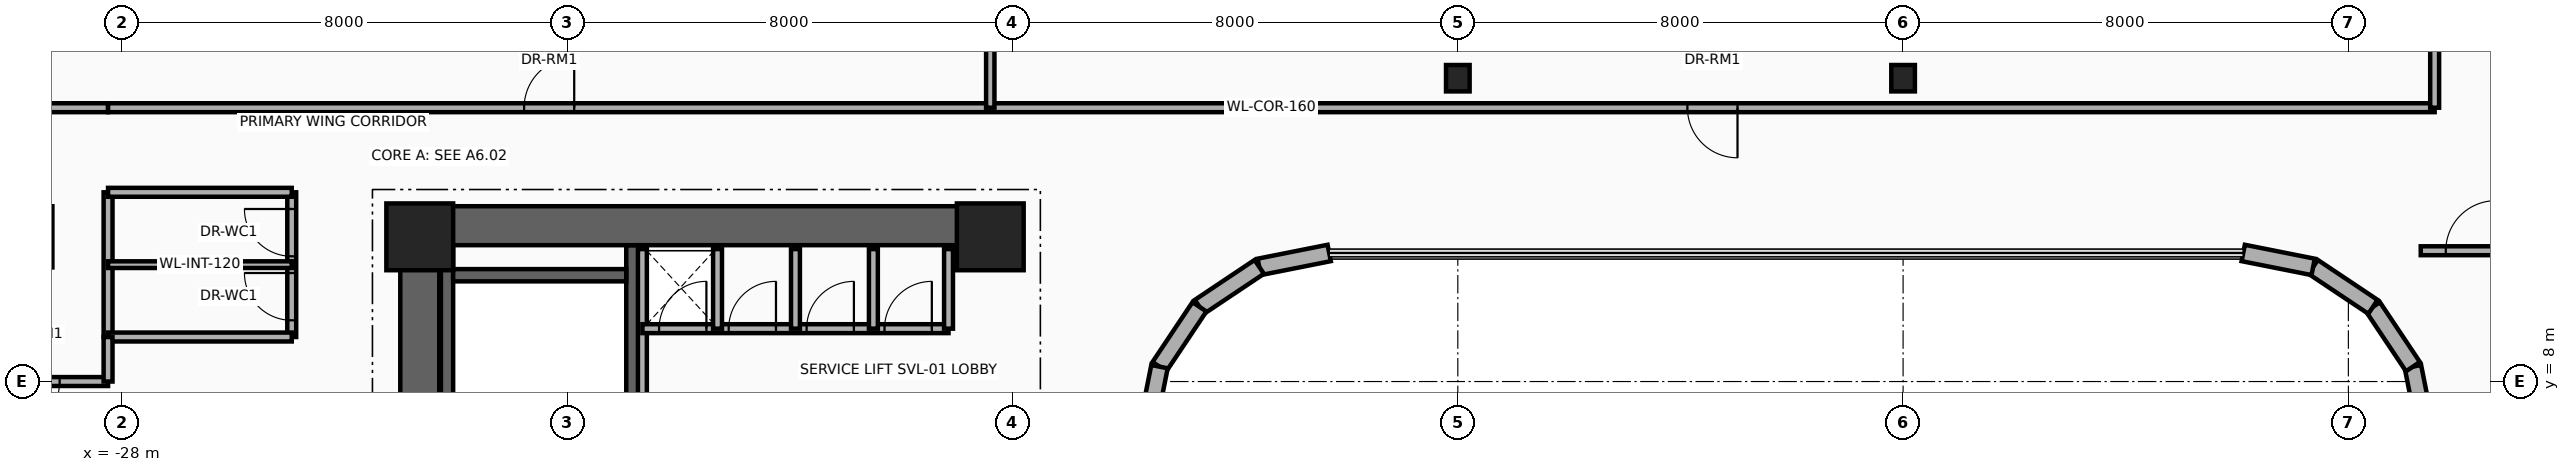
"""IFC4 building model, lengths in metres.
Left out: names, types, materials, properties, quantities, classifications, styles, units other than length and angle.
Written with IfcOpenShell. Run it as: python <this file> out.ifc"""

import sys

from ifc_helpers import new_model, si_unit, direction, frame, frame_2d, origin, origin_2d, place, context, subcontext, project, spatial, rectangle, i_section, extrude, source, transform, mapped, element, fill, save


model = new_model("IFC4")
c1 = context("Model", 3, precision=1e-05, world=origin(), true_north=direction((0.0, 1.0)))
c2 = subcontext(c1, "Body", "Model", "MODEL_VIEW")
j1 = project(units=[si_unit("LENGTHUNIT", "METRE"), si_unit("PLANEANGLEUNIT", "RADIAN")], contexts=[c1])
p1 = place(None, origin())
s1 = spatial("IfcSite", under=j1, at=p1, CompositionType="ELEMENT")
p2 = place(p1, origin())
s2 = spatial("IfcBuilding", under=s1, at=p2, CompositionType="ELEMENT")
p3 = place(p2, frame((0.0, 0.0, 124.2)))
s3 = spatial("IfcBuildingStorey", under=s2, at=p3, CompositionType="ELEMENT", Elevation=124.2)
for number, where, z_axis, x_axis in (
    (1, (-22.16, 1.78, 0.0), (0.0, 0.0, 1.0), (0.0, 1.0, 0.0)),
    (2, (-18.83, 1.78, 0.0), (0.0, 0.0, 1.0), (0.0, 1.0, 0.0)),
):
    element("IfcWall", number, at=place(p3, frame(where, z_axis=z_axis, x_axis=x_axis)), inside=s3, PredefinedType="SHEAR", context=c2, shape_type="SweptSolid", body=[
        extrude(rectangle(XDim=8.67, YDim=0.22, at=frame_2d((4.335, 0.0))), origin(), (0.0, 0.0, 1.0), 3.46),
    ])
p4 = place(p3, frame((-22.05, 9.91, 0.0), z_axis=(0.0, 0.0, 1.0), x_axis=(1.0, 0.0, 0.0)))
e3 = element("IfcWall", 3, at=p4, inside=s3, PredefinedType="SHEAR", context=c2, shape_type="SweptSolid", body=[
    extrude(rectangle(XDim=3.11, YDim=0.22, at=frame_2d((1.555, 0.0))), origin(), (0.0, 0.0, 1.0), 3.46),
])
p5 = place(p3, frame((-22.65, -11.15, 0.0), z_axis=(0.0, 0.0, 1.0), x_axis=(0.0, 1.0, 0.0)))
e4 = element("IfcWall", 4, at=p5, inside=s3, PredefinedType="SHEAR", context=c2, shape_type="SweptSolid", body=[
    extrude(rectangle(XDim=22.3, YDim=0.7, at=frame_2d((11.15, 0.0))), origin(), (0.0, 0.0, 1.0), 3.46),
])
p6 = place(p3, frame((-22.65, 10.8, 0.0), z_axis=(0.0, 0.0, 1.0), x_axis=(1.0, 0.0, 0.0)))
e5 = element("IfcWall", 5, at=p6, inside=s3, PredefinedType="SHEAR", context=c2, shape_type="SweptSolid", body=[
    extrude(rectangle(XDim=10.25, YDim=0.7, at=frame_2d((5.125, 0.0))), origin(), (0.0, 0.0, 1.0), 3.46),
])
m1 = source(origin(), c2, "Body", "SweptSolid", [
    extrude(rectangle(XDim=1.2, YDim=1.2, at=origin_2d()), origin(), (0.0, 0.0, 1.0), 3.7),
])
for number, where, z_axis, x_axis in (
    (6, (-22.65, 10.6, 0.0), (0.0, 0.0, 1.0), (1.0, 0.0, 0.0)),
    (7, (-12.4, 10.6, 0.0), (0.0, 0.0, 1.0), (1.0, 0.0, 0.0)),
):
    element("IfcColumn", number, at=place(p3, frame(where, z_axis=z_axis, x_axis=x_axis)), inside=s3, PredefinedType="COLUMN", context=c2, shape_type="MappedRepresentation", body=[
        mapped(m1, transform((0.0, 0.0, 0.0), x_axis=(1.0, 0.0, 0.0), y_axis=(0.0, 1.0, 0.0), z_axis=(0.0, 0.0, 1.0), scale=1.0)),
    ])
m2 = source(origin(), c2, "Body", "SweptSolid", [
    extrude(i_section(OverallWidth=0.424, OverallDepth=0.474, WebThickness=0.048, FlangeThickness=0.077, at=origin_2d()), origin(), (0.0, 0.0, 1.0), 3.7),
])
for number, where, z_axis, x_axis in (
    (8, (-4.0, 13.45, 0.0), (0.0, 0.0, 1.0), (1.0, 0.0, 0.0)),
    (9, (4.0, 13.45, 0.0), (0.0, 0.0, 1.0), (1.0, 0.0, 0.0)),
):
    element("IfcColumn", number, at=place(p3, frame(where, z_axis=z_axis, x_axis=x_axis)), inside=s3, PredefinedType="COLUMN", context=c2, shape_type="MappedRepresentation", body=[
        mapped(m2, transform((0.0, 0.0, 0.0), x_axis=(1.0, 0.0, 0.0), y_axis=(0.0, 1.0, 0.0), z_axis=(0.0, 0.0, 1.0), scale=1.0)),
    ])
p7 = place(p3, frame((13.41, 7.011, 0.0), z_axis=(0.0, 0.0, 1.0), x_axis=(-0.195090163074, 0.980785312019, 0.0)))
e10 = element("IfcWall", 10, at=p7, inside=s3, PredefinedType="SOLIDWALL", context=c2, shape_type="SweptSolid", body=[
    extrude(rectangle(XDim=1.281, YDim=0.3, at=frame_2d((0.641, 0.0))), origin(), (0.0, 0.0, 1.0), 3.46),
])
for number, where, z_axis, x_axis in (
    (11, (13.16, 8.268, 0.0), (0.0, 0.0, 1.0), (-0.556, 0.831, 0.0)),
    (12, (12.442, 9.342, 0.0), (0.0, 0.0, 1.0), (-0.831, 0.556, 0.0)),
):
    element("IfcWall", number, at=place(p3, frame(where, z_axis=z_axis, x_axis=x_axis)), inside=s3, PredefinedType="SOLIDWALL", context=c2, shape_type="SweptSolid", body=[
        extrude(rectangle(XDim=1.292, YDim=0.3, at=frame_2d((0.646, 0.0))), origin(), (0.0, 0.0, 1.0), 3.46),
    ])
for number, where, z_axis, x_axis in (
    (13, (11.367, 10.06, 0.0), (0.0, 0.0, 1.0), (-0.981, 0.195, 0.0)),
    (14, (-6.311, 10.31, 0.0), (0.0, 0.0, 1.0), (-0.981, -0.195, 0.0)),
):
    element("IfcWall", number, at=place(p3, frame(where, z_axis=z_axis, x_axis=x_axis)), inside=s3, PredefinedType="SOLIDWALL", context=c2, shape_type="SweptSolid", body=[
        extrude(rectangle(XDim=1.281, YDim=0.3, at=frame_2d((0.641, 0.0))), origin(), (0.0, 0.0, 1.0), 3.46),
    ])
p8 = place(p3, frame((-7.567, 10.06, 0.0), z_axis=(0.0, 0.0, 1.0), x_axis=(-0.831497739511, -0.555528135371, 0.0)))
e15 = element("IfcWall", 15, at=p8, inside=s3, PredefinedType="SOLIDWALL", context=c2, shape_type="SweptSolid", body=[
    extrude(rectangle(XDim=1.292, YDim=0.3, at=frame_2d((0.646, 0.0))), origin(), (0.0, 0.0, 1.0), 3.46),
])
p9 = place(p3, frame((-8.642, 9.342, 0.0), z_axis=(0.0, 0.0, 1.0), x_axis=(-0.555615398575, -0.831439431869, 0.0)))
e16 = element("IfcWall", 16, at=p9, inside=s3, PredefinedType="SOLIDWALL", context=c2, shape_type="SweptSolid", body=[
    extrude(rectangle(XDim=1.292, YDim=0.3, at=frame_2d((0.646, 0.0))), origin(), (0.0, 0.0, 1.0), 3.46),
])
p10 = place(p3, frame((-9.36, 8.268, 0.0), z_axis=(0.0, 0.0, 1.0), x_axis=(-0.195090163074, -0.980785312019, 0.0)))
e17 = element("IfcWall", 17, at=p10, inside=s3, PredefinedType="SOLIDWALL", context=c2, shape_type="SweptSolid", body=[
    extrude(rectangle(XDim=1.281, YDim=0.3, at=frame_2d((0.641, 0.0))), origin(), (0.0, 0.0, 1.0), 3.46),
])
p11 = place(p3, frame((-18.65, 7.45, 0.0), z_axis=(0.0, 0.0, 1.0), x_axis=(0.0, 1.0, 0.0)))
e18 = element("IfcWall", 18, at=p11, inside=s3, PredefinedType="PARTITIONING", context=c2, shape_type="SweptSolid", body=[
    extrude(rectangle(XDim=2.93, YDim=0.16, at=frame_2d((1.465, 0.0))), origin(), (0.0, 0.0, 1.0), 3.46),
])
p12 = place(p3, frame((-18.65, 8.95, 0.0), z_axis=(0.0, 0.0, 1.0), x_axis=(1.0, 0.0, 0.0)))
e19 = element("IfcWall", 19, at=p12, inside=s3, PredefinedType="PARTITIONING", context=c2, shape_type="SweptSolid", body=[
    extrude(rectangle(XDim=5.5, YDim=0.16, at=frame_2d((2.75, 0.0))), origin(), (0.0, 0.0, 1.0), 3.46),
])
p13 = place(p12, frame((0.3, 0.0, 0.0)))
e20 = element("IfcOpeningElement", 20, at=p13, cuts=e19, PredefinedType="OPENING", context=c2, shape_type="SweptSolid", body=[
    extrude(rectangle(XDim=0.85, YDim=2.05, at=frame_2d((0.425, 1.025))), frame((0.0, 0.095, 0.0), z_axis=(0.0, -1.0, 0.0), x_axis=(1.0, 0.0, 0.0)), (0.0, 0.0, 1.0), 0.19),
])
p14 = place(p12, frame((1.55, 0.0, 0.0)))
e21 = element("IfcOpeningElement", 21, at=p14, cuts=e19, PredefinedType="OPENING", context=c2, shape_type="SweptSolid", body=[
    extrude(rectangle(XDim=0.85, YDim=2.05, at=frame_2d((0.425, 1.025))), frame((0.0, 0.095, 0.0), z_axis=(0.0, -1.0, 0.0), x_axis=(1.0, 0.0, 0.0)), (0.0, 0.0, 1.0), 0.19),
])
p15 = place(p12, frame((2.95, 0.0, 0.0)))
e22 = element("IfcOpeningElement", 22, at=p15, cuts=e19, PredefinedType="OPENING", context=c2, shape_type="SweptSolid", body=[
    extrude(rectangle(XDim=0.85, YDim=2.05, at=frame_2d((0.425, 1.025))), frame((0.0, 0.095, 0.0), z_axis=(0.0, -1.0, 0.0), x_axis=(1.0, 0.0, 0.0)), (0.0, 0.0, 1.0), 0.19),
])
p16 = place(p12, frame((4.35, 0.0, 0.0)))
e23 = element("IfcOpeningElement", 23, at=p16, cuts=e19, PredefinedType="OPENING", context=c2, shape_type="SweptSolid", body=[
    extrude(rectangle(XDim=0.85, YDim=2.05, at=frame_2d((0.425, 1.025))), frame((0.0, 0.095, 0.0), z_axis=(0.0, -1.0, 0.0), x_axis=(1.0, 0.0, 0.0)), (0.0, 0.0, 1.0), 0.19),
])
for number, where, z_axis, x_axis in (
    (24, (-13.15, 8.95, 0.0), (0.0, 0.0, 1.0), (0.0, 1.0, 0.0)),
    (25, (-17.3, 8.95, 0.0), (0.0, 0.0, 1.0), (0.0, 1.0, 0.0)),
    (26, (-15.9, 8.95, 0.0), (0.0, 0.0, 1.0), (0.0, 1.0, 0.0)),
    (27, (-14.5, 8.95, 0.0), (0.0, 0.0, 1.0), (0.0, 1.0, 0.0)),
):
    element("IfcWall", number, at=place(p3, frame(where, z_axis=z_axis, x_axis=x_axis)), inside=s3, PredefinedType="PARTITIONING", context=c2, shape_type="SweptSolid", body=[
        extrude(rectangle(XDim=1.43, YDim=0.16, at=frame_2d((0.715, 0.0))), origin(), (0.0, 0.0, 1.0), 3.46),
    ])
p17 = place(p3, frame((-28.25, 8.8, 0.0), z_axis=(0.0, 0.0, 1.0), x_axis=(0.0, 1.0, 0.0)))
e28 = element("IfcWall", 28, at=p17, inside=s3, PredefinedType="PARTITIONING", context=c2, shape_type="SweptSolid", body=[
    extrude(rectangle(XDim=2.6, YDim=0.16, at=frame_2d((1.3, 0.0))), origin(), (0.0, 0.0, 1.0), 2.666),
])
p18 = place(p3, frame((-24.95, 8.8, 0.0), z_axis=(0.0, 0.0, 1.0), x_axis=(0.0, 1.0, 0.0)))
e29 = element("IfcWall", 29, at=p18, inside=s3, PredefinedType="PARTITIONING", context=c2, shape_type="SweptSolid", body=[
    extrude(rectangle(XDim=2.6, YDim=0.16, at=frame_2d((1.3, 0.0))), origin(), (0.0, 0.0, 1.0), 2.666),
])
p19 = place(p18, frame((0.3, 0.0, 0.0)))
e30 = element("IfcOpeningElement", 30, at=p19, cuts=e29, PredefinedType="OPENING", context=c2, shape_type="SweptSolid", body=[
    extrude(rectangle(XDim=0.85, YDim=2.1, at=frame_2d((0.425, 1.05))), frame((0.0, 0.095, 0.0), z_axis=(0.0, -1.0, 0.0), x_axis=(1.0, 0.0, 0.0)), (0.0, 0.0, 1.0), 0.19),
])
p20 = place(p18, frame((1.45, 0.0, 0.0)))
e31 = element("IfcOpeningElement", 31, at=p20, cuts=e29, PredefinedType="OPENING", context=c2, shape_type="SweptSolid", body=[
    extrude(rectangle(XDim=0.85, YDim=2.1, at=frame_2d((0.425, 1.05))), frame((0.0, 0.095, 0.0), z_axis=(0.0, -1.0, 0.0), x_axis=(1.0, 0.0, 0.0)), (0.0, 0.0, 1.0), 0.19),
])
for number, where, z_axis, x_axis in (
    (32, (-28.25, 8.8, 0.0), (0.0, 0.0, 1.0), (1.0, 0.0, 0.0)),
    (33, (-28.25, 11.4, 0.0), (0.0, 0.0, 1.0), (1.0, 0.0, 0.0)),
):
    element("IfcWall", number, at=place(p3, frame(where, z_axis=z_axis, x_axis=x_axis)), inside=s3, PredefinedType="PARTITIONING", context=c2, shape_type="SweptSolid", body=[
        extrude(rectangle(XDim=3.3, YDim=0.16, at=frame_2d((1.65, 0.0))), origin(), (0.0, 0.0, 1.0), 3.46),
    ])
p21 = place(p3, frame((-28.25, 10.1, 0.0), z_axis=(0.0, 0.0, 1.0), x_axis=(1.0, 0.0, 0.0)))
e34 = element("IfcWall", 34, at=p21, inside=s3, PredefinedType="PARTITIONING", context=c2, shape_type="SweptSolid", body=[
    extrude(rectangle(XDim=3.3, YDim=0.12, at=frame_2d((1.65, 0.0))), origin(), (0.0, 0.0, 1.0), 3.46),
])
p22 = place(p3, frame((-30.89, 8.0, 0.0), z_axis=(0.0, 0.0, 1.0), x_axis=(1.0, 0.0, 0.0)))
e35 = element("IfcWall", 35, at=p22, inside=s3, PredefinedType="PARTITIONING", context=c2, shape_type="SweptSolid", body=[
    extrude(rectangle(XDim=2.64, YDim=0.16, at=frame_2d((1.32, 0.0))), origin(), (0.0, 0.0, 1.0), 2.896),
])
p23 = place(p22, frame((0.87, 0.0, 0.0)))
e36 = element("IfcOpeningElement", 36, at=p23, cuts=e35, PredefinedType="OPENING", context=c2, shape_type="SweptSolid", body=[
    extrude(rectangle(XDim=0.9, YDim=2.1, at=frame_2d((0.45, 1.05))), frame((0.0, 0.095, 0.0), z_axis=(0.0, -1.0, 0.0), x_axis=(1.0, 0.0, 0.0)), (0.0, 0.0, 1.0), 0.19),
])
p24 = place(p3, frame((-28.25, 8.0, 0.0), z_axis=(0.0, 0.0, 1.0), x_axis=(0.0, 1.0, 0.0)))
e37 = element("IfcWall", 37, at=p24, inside=s3, PredefinedType="PARTITIONING", context=c2, shape_type="SweptSolid", body=[
    extrude(rectangle(XDim=0.8, YDim=0.16, at=frame_2d((0.4, 0.0))), origin(), (0.0, 0.0, 1.0), 2.988),
])
p25 = place(p3, frame((-32.54, 12.92, 0.0), z_axis=(0.0, 0.0, 1.0), x_axis=(1.0, 0.0, 0.0)))
e38 = element("IfcWall", 38, at=p25, inside=s3, PredefinedType="PARTITIONING", context=c2, shape_type="SweptSolid", body=[
    extrude(rectangle(XDim=4.29, YDim=0.16, at=frame_2d((2.145, 0.0))), origin(), (0.0, 0.0, 1.0), 2.896),
])
p26 = place(p3, frame((-28.25, 12.92, 0.0), z_axis=(0.0, 0.0, 1.0), x_axis=(1.0, 0.0, 0.0)))
e39 = element("IfcWall", 39, at=p26, inside=s3, PredefinedType="PARTITIONING", context=c2, shape_type="SweptSolid", body=[
    extrude(rectangle(XDim=41.8, YDim=0.16, at=frame_2d((20.9, 0.0))), origin(), (0.0, 0.0, 1.0), 2.666),
])
p27 = place(p26, frame((7.475, 0.0, 0.0)))
e40 = element("IfcOpeningElement", 40, at=p27, cuts=e39, PredefinedType="OPENING", context=c2, shape_type="SweptSolid", body=[
    extrude(rectangle(XDim=0.9, YDim=2.1, at=frame_2d((0.45, 1.05))), frame((0.0, 0.095, 0.0), z_axis=(0.0, -1.0, 0.0), x_axis=(1.0, 0.0, 0.0)), (0.0, 0.0, 1.0), 0.19),
])
p28 = place(p26, frame((28.375, 0.0, 0.0)))
e41 = element("IfcOpeningElement", 41, at=p28, cuts=e39, PredefinedType="OPENING", context=c2, shape_type="SweptSolid", body=[
    extrude(rectangle(XDim=0.9, YDim=2.1, at=frame_2d((0.45, 1.05))), frame((0.0, 0.095, 0.0), z_axis=(0.0, -1.0, 0.0), x_axis=(1.0, 0.0, 0.0)), (0.0, 0.0, 1.0), 0.19),
])
p29 = place(p3, frame((13.55, 12.92, 0.0), z_axis=(0.0, 0.0, 1.0), x_axis=(0.0, 1.0, 0.0)))
e42 = element("IfcWall", 42, at=p29, inside=s3, PredefinedType="PARTITIONING", context=c2, shape_type="SweptSolid", body=[
    extrude(rectangle(XDim=5.857, YDim=0.16, at=frame_2d((2.928, 0.0))), origin(), (0.0, 0.0, 1.0), 2.666),
])
p30 = place(p3, frame((-12.4, 12.92, 0.0), z_axis=(0.0, 0.0, 1.0), x_axis=(0.0, 1.0, 0.0)))
e43 = element("IfcWall", 43, at=p30, inside=s3, PredefinedType="PARTITIONING", context=c2, shape_type="SweptSolid", body=[
    extrude(rectangle(XDim=7.351, YDim=0.15, at=frame_2d((3.675, 0.0))), origin(), (0.0, 0.0, 1.0), 2.666),
])
p31 = place(p3, frame((13.3, 10.35, 0.0), z_axis=(0.0, 0.0, 1.0), x_axis=(1.0, 0.0, 0.0)))
e44 = element("IfcWall", 44, at=p31, inside=s3, PredefinedType="PARTITIONING", context=c2, shape_type="SweptSolid", body=[
    extrude(rectangle(XDim=2.1, YDim=0.16, at=frame_2d((1.05, 0.0))), origin(), (0.0, 0.0, 1.0), 2.666),
])
p32 = place(p31, frame((0.45, 0.0, 0.0)))
e45 = element("IfcOpeningElement", 45, at=p32, cuts=e44, PredefinedType="OPENING", context=c2, shape_type="SweptSolid", body=[
    extrude(rectangle(XDim=0.9, YDim=2.1, at=frame_2d((0.45, 1.05))), frame((0.0, 0.095, 0.0), z_axis=(0.0, -1.0, 0.0), x_axis=(1.0, 0.0, 0.0)), (0.0, 0.0, 1.0), 0.19),
])
p33 = place(p13, origin())
e46 = element("IfcDoor", 46, at=p33, inside=s3, OperationType="SINGLE_SWING_LEFT", PredefinedType="DOOR", context=c2, shape_type="SweptSolid", body=[
    extrude(rectangle(XDim=0.85, YDim=2.05, at=frame_2d((0.425, 1.025))), frame((0.0, 0.025, 0.0), z_axis=(0.0, -1.0, 0.0), x_axis=(1.0, 0.0, 0.0)), (0.0, 0.0, 1.0), 0.05),
])
fill(e20, e46)
p34 = place(p14, origin())
e47 = element("IfcDoor", 47, at=p34, inside=s3, OperationType="SINGLE_SWING_RIGHT", PredefinedType="DOOR", context=c2, shape_type="SweptSolid", body=[
    extrude(rectangle(XDim=0.85, YDim=2.05, at=frame_2d((0.425, 1.025))), frame((0.0, 0.025, 0.0), z_axis=(0.0, -1.0, 0.0), x_axis=(1.0, 0.0, 0.0)), (0.0, 0.0, 1.0), 0.05),
])
fill(e21, e47)
p35 = place(p15, origin())
e48 = element("IfcDoor", 48, at=p35, inside=s3, OperationType="SINGLE_SWING_LEFT", PredefinedType="DOOR", context=c2, shape_type="SweptSolid", body=[
    extrude(rectangle(XDim=0.85, YDim=2.05, at=frame_2d((0.425, 1.025))), frame((0.0, 0.025, 0.0), z_axis=(0.0, -1.0, 0.0), x_axis=(1.0, 0.0, 0.0)), (0.0, 0.0, 1.0), 0.05),
])
fill(e22, e48)
p36 = place(p16, origin())
e49 = element("IfcDoor", 49, at=p36, inside=s3, OperationType="SINGLE_SWING_RIGHT", PredefinedType="DOOR", context=c2, shape_type="SweptSolid", body=[
    extrude(rectangle(XDim=0.85, YDim=2.05, at=frame_2d((0.425, 1.025))), frame((0.0, 0.025, 0.0), z_axis=(0.0, -1.0, 0.0), x_axis=(1.0, 0.0, 0.0)), (0.0, 0.0, 1.0), 0.05),
])
fill(e23, e49)
p37 = place(p19, origin())
e50 = element("IfcDoor", 50, at=p37, inside=s3, OperationType="SINGLE_SWING_RIGHT", PredefinedType="DOOR", context=c2, shape_type="SweptSolid", body=[
    extrude(rectangle(XDim=0.85, YDim=2.1, at=frame_2d((0.425, 1.05))), frame((0.0, 0.025, 0.0), z_axis=(0.0, -1.0, 0.0), x_axis=(1.0, 0.0, 0.0)), (0.0, 0.0, 1.0), 0.05),
])
fill(e30, e50)
p38 = place(p20, origin())
e51 = element("IfcDoor", 51, at=p38, inside=s3, OperationType="SINGLE_SWING_LEFT", PredefinedType="DOOR", context=c2, shape_type="SweptSolid", body=[
    extrude(rectangle(XDim=0.85, YDim=2.1, at=frame_2d((0.425, 1.05))), frame((0.0, 0.025, 0.0), z_axis=(0.0, -1.0, 0.0), x_axis=(1.0, 0.0, 0.0)), (0.0, 0.0, 1.0), 0.05),
])
fill(e31, e51)
p39 = place(p23, frame((0.9, 0.0, 0.0), z_axis=(0.0, 0.0, 1.0), x_axis=(-1.0, 0.0, 0.0)))
e52 = element("IfcDoor", 52, at=p39, inside=s3, OperationType="SINGLE_SWING_LEFT", PredefinedType="DOOR", context=c2, shape_type="SweptSolid", body=[
    extrude(rectangle(XDim=0.9, YDim=2.1, at=frame_2d((0.45, 1.05))), frame((0.0, 0.025, 0.0), z_axis=(0.0, -1.0, 0.0), x_axis=(1.0, 0.0, 0.0)), (0.0, 0.0, 1.0), 0.05),
])
fill(e36, e52)
p40 = place(p27, origin())
e53 = element("IfcDoor", 53, at=p40, inside=s3, OperationType="SINGLE_SWING_RIGHT", PredefinedType="DOOR", context=c2, shape_type="SweptSolid", body=[
    extrude(rectangle(XDim=0.9, YDim=2.1, at=frame_2d((0.45, 1.05))), frame((0.0, 0.025, 0.0), z_axis=(0.0, -1.0, 0.0), x_axis=(1.0, 0.0, 0.0)), (0.0, 0.0, 1.0), 0.05),
])
fill(e40, e53)
p41 = place(p28, frame((0.9, 0.0, 0.0), z_axis=(0.0, 0.0, 1.0), x_axis=(-1.0, 0.0, 0.0)))
e54 = element("IfcDoor", 54, at=p41, inside=s3, OperationType="SINGLE_SWING_LEFT", PredefinedType="DOOR", context=c2, shape_type="SweptSolid", body=[
    extrude(rectangle(XDim=0.9, YDim=2.1, at=frame_2d((0.45, 1.05))), frame((0.0, 0.025, 0.0), z_axis=(0.0, -1.0, 0.0), x_axis=(1.0, 0.0, 0.0)), (0.0, 0.0, 1.0), 0.05),
])
fill(e41, e54)
p42 = place(p32, origin())
e55 = element("IfcDoor", 55, at=p42, inside=s3, OperationType="SINGLE_SWING_RIGHT", PredefinedType="DOOR", context=c2, shape_type="SweptSolid", body=[
    extrude(rectangle(XDim=0.9, YDim=2.1, at=frame_2d((0.45, 1.05))), frame((0.0, 0.025, 0.0), z_axis=(0.0, -1.0, 0.0), x_axis=(1.0, 0.0, 0.0)), (0.0, 0.0, 1.0), 0.05),
])
fill(e45, e55)
save(model, sys.argv[1])
